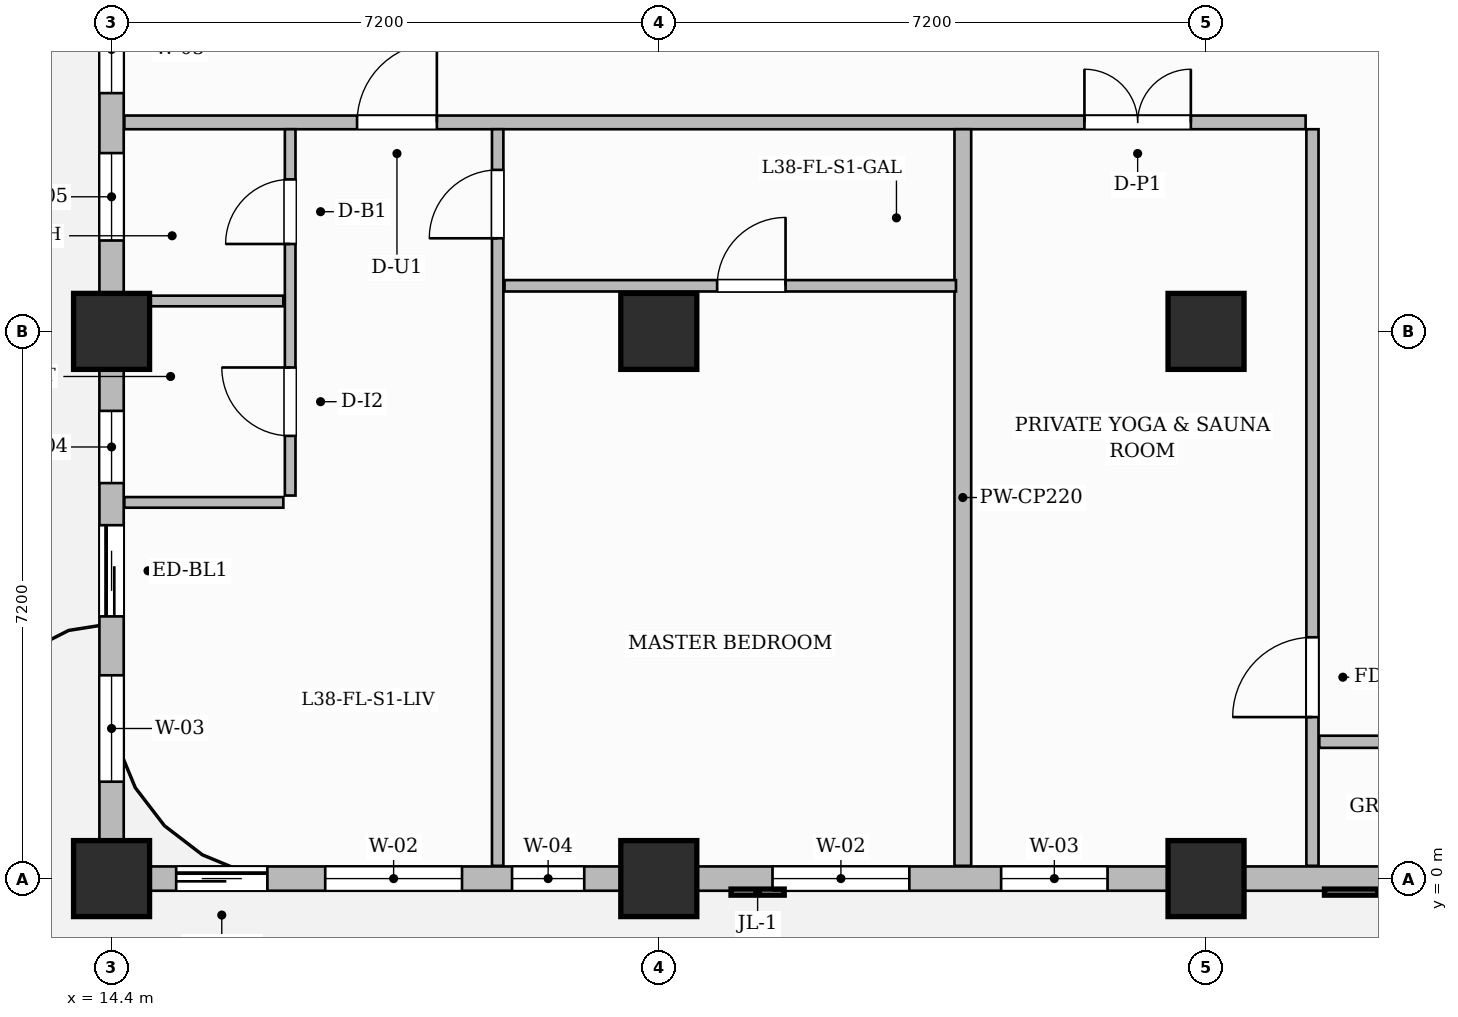
"""IFC4 building model, lengths in metres.
Left out: names, types, materials, properties, quantities, classifications, styles, units other than length and angle.
Written with IfcOpenShell. Run it as: python <this file> out.ifc"""

import sys

from ifc_helpers import new_model, si_unit, direction, frame, frame_2d, origin, origin_2d, place, context, subcontext, project, spatial, rectangle, extrude, source, transform, mapped, element, fill, save


model = new_model("IFC4")
c1 = context("Model", 3, precision=1e-05, world=origin(), true_north=direction((0.0, 1.0)))
c2 = subcontext(c1, "Body", "Model", "MODEL_VIEW")
j1 = project(units=[si_unit("LENGTHUNIT", "METRE"), si_unit("PLANEANGLEUNIT", "RADIAN")], contexts=[c1])
p1 = place(None, origin())
s1 = spatial("IfcSite", under=j1, at=p1, CompositionType="ELEMENT")
p2 = place(p1, origin())
s2 = spatial("IfcBuilding", under=s1, at=p2, CompositionType="ELEMENT")
p3 = place(p2, frame((0.0, 0.0, 154.15)))
s3 = spatial("IfcBuildingStorey", under=s2, at=p3, CompositionType="ELEMENT", Elevation=154.15)
m1 = source(origin(), c2, "Body", "SweptSolid", [
    extrude(rectangle(XDim=1.0, YDim=1.0, at=origin_2d()), origin(), (0.0, 0.0, 1.0), 3.85),
])
for number, where, z_axis, x_axis in (
    (1, (14.4, 0.0, 0.0), (0.0, 0.0, 1.0), (1.0, 0.0, 0.0)),
    (2, (14.4, 7.2, 0.0), (0.0, 0.0, 1.0), (1.0, 0.0, 0.0)),
    (3, (21.6, 0.0, 0.0), (0.0, 0.0, 1.0), (1.0, 0.0, 0.0)),
    (4, (21.6, 7.2, 0.0), (0.0, 0.0, 1.0), (1.0, 0.0, 0.0)),
    (5, (28.8, 0.0, 0.0), (0.0, 0.0, 1.0), (1.0, 0.0, 0.0)),
    (6, (28.8, 7.2, 0.0), (0.0, 0.0, 1.0), (1.0, 0.0, 0.0)),
):
    element("IfcColumn", number, at=place(p3, frame(where, z_axis=z_axis, x_axis=x_axis)), inside=s3, PredefinedType="COLUMN", context=c2, shape_type="MappedRepresentation", body=[
        mapped(m1, transform((0.0, 0.0, 0.0), scale=1.0)),
    ])
p4 = place(p3, frame((14.568, 9.95, 0.0), z_axis=(0.0, 0.0, 1.0), x_axis=(1.0, 0.0, 0.0)))
e7 = element("IfcWall", 7, at=p4, inside=s3, PredefinedType="PARTITIONING", context=c2, shape_type="SweptSolid", body=[
    extrude(rectangle(XDim=15.542, YDim=0.18, at=frame_2d((7.771, 0.0))), origin(), (0.0, 0.0, 1.0), 3.6),
])
p5 = place(p4, frame((3.062, 0.0, 0.0)))
e8 = element("IfcOpeningElement", 8, at=p5, cuts=e7, PredefinedType="OPENING", context=c2, shape_type="SweptSolid", body=[
    extrude(rectangle(XDim=1.05, YDim=2.25, at=frame_2d((0.525, 1.125))), frame((0.0, 0.1, 0.0), z_axis=(0.0, -1.0, 0.0), x_axis=(1.0, 0.0, 0.0)), (0.0, 0.0, 1.0), 0.2),
])
p6 = place(p4, frame((12.632, 0.0, 0.0)))
e9 = element("IfcOpeningElement", 9, at=p6, cuts=e7, PredefinedType="OPENING", context=c2, shape_type="SweptSolid", body=[
    extrude(rectangle(XDim=1.4, YDim=2.35, at=frame_2d((0.7, 1.175))), frame((0.0, 0.1, 0.0), z_axis=(0.0, -1.0, 0.0), x_axis=(1.0, 0.0, 0.0)), (0.0, 0.0, 1.0), 0.2),
])
p7 = place(p3, frame((30.2, 0.168, 0.0), z_axis=(0.0, 0.0, 1.0), x_axis=(0.0, 1.0, 0.0)))
e10 = element("IfcWall", 10, at=p7, inside=s3, PredefinedType="PARTITIONING", context=c2, shape_type="SweptSolid", body=[
    extrude(rectangle(XDim=9.692, YDim=0.16, at=frame_2d((4.846, 0.0))), origin(), (0.0, 0.0, 1.0), 3.6),
])
p8 = place(p7, frame((1.957, 0.0, 0.0)))
e11 = element("IfcOpeningElement", 11, at=p8, cuts=e10, PredefinedType="OPENING", context=c2, shape_type="SweptSolid", body=[
    extrude(rectangle(XDim=1.05, YDim=2.15, at=frame_2d((0.525, 1.075))), frame((0.0, 0.09, 0.0), z_axis=(0.0, -1.0, 0.0), x_axis=(1.0, 0.0, 0.0)), (0.0, 0.0, 1.0), 0.18),
])
p9 = place(p3, frame((30.29, 1.8, 0.0), z_axis=(0.0, 0.0, 1.0), x_axis=(1.0, 0.0, 0.0)))
e12 = element("IfcWall", 12, at=p9, inside=s3, PredefinedType="PARTITIONING", context=c2, shape_type="SweptSolid", body=[
    extrude(rectangle(XDim=19.37, YDim=0.16, at=frame_2d((9.685, 0.0))), origin(), (0.0, 0.0, 1.0), 3.6),
])
p10 = place(p9, frame((5.074, 0.0, 0.0)))
e13 = element("IfcOpeningElement", 13, at=p10, cuts=e12, PredefinedType="OPENING", context=c2, shape_type="SweptSolid", body=[
    extrude(rectangle(XDim=0.9, YDim=2.15, at=frame_2d((0.45, 1.075))), frame((0.0, 0.09, 0.0), z_axis=(0.0, -1.0, 0.0), x_axis=(1.0, 0.0, 0.0)), (0.0, 0.0, 1.0), 0.18),
])
p11 = place(p9, frame((14.06, 0.0, 0.0)))
e14 = element("IfcOpeningElement", 14, at=p11, cuts=e12, PredefinedType="OPENING", context=c2, shape_type="SweptSolid", body=[
    extrude(rectangle(XDim=0.9, YDim=2.15, at=frame_2d((0.45, 1.075))), frame((0.0, 0.09, 0.0), z_axis=(0.0, -1.0, 0.0), x_axis=(1.0, 0.0, 0.0)), (0.0, 0.0, 1.0), 0.18),
])
p12 = place(p3, frame((25.6, 0.168, 0.0), z_axis=(0.0, 0.0, 1.0), x_axis=(0.0, 1.0, 0.0)))
e15 = element("IfcWall", 15, at=p12, inside=s3, PredefinedType="PARTITIONING", context=c2, shape_type="SweptSolid", body=[
    extrude(rectangle(XDim=9.692, YDim=0.22, at=frame_2d((4.846, 0.0))), origin(), (0.0, 0.0, 1.0), 3.6),
])
p13 = place(p3, frame((16.75, 5.04, 0.0), z_axis=(0.0, 0.0, 1.0), x_axis=(0.0, 1.0, 0.0)))
e16 = element("IfcWall", 16, at=p13, inside=s3, PredefinedType="PARTITIONING", context=c2, shape_type="SweptSolid", body=[
    extrude(rectangle(XDim=4.82, YDim=0.14, at=frame_2d((2.41, 0.0))), origin(), (0.0, 0.0, 1.0), 3.6),
])
p14 = place(p13, frame((0.785, 0.0, 0.0)))
e17 = element("IfcOpeningElement", 17, at=p14, cuts=e16, PredefinedType="OPENING", context=c2, shape_type="SweptSolid", body=[
    extrude(rectangle(XDim=0.9, YDim=2.15, at=frame_2d((0.45, 1.075))), frame((0.0, 0.08, 0.0), z_axis=(0.0, -1.0, 0.0), x_axis=(1.0, 0.0, 0.0)), (0.0, 0.0, 1.0), 0.16),
])
p15 = place(p13, frame((3.31, 0.0, 0.0)))
e18 = element("IfcOpeningElement", 18, at=p15, cuts=e16, PredefinedType="OPENING", context=c2, shape_type="SweptSolid", body=[
    extrude(rectangle(XDim=0.85, YDim=2.1, at=frame_2d((0.425, 1.05))), frame((0.0, 0.08, 0.0), z_axis=(0.0, -1.0, 0.0), x_axis=(1.0, 0.0, 0.0)), (0.0, 0.0, 1.0), 0.16),
])
p16 = place(p3, frame((14.59, 7.6, 0.0), z_axis=(0.0, 0.0, 1.0), x_axis=(1.0, 0.0, 0.0)))
e19 = element("IfcWall", 19, at=p16, inside=s3, PredefinedType="PARTITIONING", context=c2, shape_type="SweptSolid", body=[
    extrude(rectangle(XDim=2.07, YDim=0.14, at=frame_2d((1.035, 0.0))), origin(), (0.0, 0.0, 1.0), 3.6),
])
p17 = place(p3, frame((14.568, 4.95, 0.0), z_axis=(0.0, 0.0, 1.0), x_axis=(1.0, 0.0, 0.0)))
e20 = element("IfcWall", 20, at=p17, inside=s3, PredefinedType="PARTITIONING", context=c2, shape_type="SweptSolid", body=[
    extrude(rectangle(XDim=2.092, YDim=0.14, at=frame_2d((1.046, 0.0))), origin(), (0.0, 0.0, 1.0), 3.6),
])
p18 = place(p3, frame((19.48, 0.168, 0.0), z_axis=(0.0, 0.0, 1.0), x_axis=(0.0, 1.0, 0.0)))
e21 = element("IfcWall", 21, at=p18, inside=s3, PredefinedType="PARTITIONING", context=c2, shape_type="SweptSolid", body=[
    extrude(rectangle(XDim=9.692, YDim=0.15, at=frame_2d((4.846, 0.0))), origin(), (0.0, 0.0, 1.0), 3.6),
])
p19 = place(p18, frame((8.257, 0.0, 0.0)))
e22 = element("IfcOpeningElement", 22, at=p19, cuts=e21, PredefinedType="OPENING", context=c2, shape_type="SweptSolid", body=[
    extrude(rectangle(XDim=0.9, YDim=2.15, at=frame_2d((0.45, 1.075))), frame((0.0, 0.085, 0.0), z_axis=(0.0, -1.0, 0.0), x_axis=(1.0, 0.0, 0.0)), (0.0, 0.0, 1.0), 0.17),
])
p20 = place(p3, frame((19.57, 7.8, 0.0), z_axis=(0.0, 0.0, 1.0), x_axis=(1.0, 0.0, 0.0)))
e23 = element("IfcWall", 23, at=p20, inside=s3, PredefinedType="PARTITIONING", context=c2, shape_type="SweptSolid", body=[
    extrude(rectangle(XDim=5.94, YDim=0.15, at=frame_2d((2.97, 0.0))), origin(), (0.0, 0.0, 1.0), 3.6),
])
p21 = place(p20, frame((2.798, 0.0, 0.0)))
e24 = element("IfcOpeningElement", 24, at=p21, cuts=e23, PredefinedType="OPENING", context=c2, shape_type="SweptSolid", body=[
    extrude(rectangle(XDim=0.9, YDim=2.15, at=frame_2d((0.45, 1.075))), frame((0.0, 0.085, 0.0), z_axis=(0.0, -1.0, 0.0), x_axis=(1.0, 0.0, 0.0)), (0.0, 0.0, 1.0), 0.17),
])
p22 = place(p3, frame((14.4, 0.0, 0.0), z_axis=(0.0, 0.0, 1.0), x_axis=(1.0, 0.0, 0.0)))
e25 = element("IfcWall", 25, at=p22, inside=s3, PredefinedType="SOLIDWALL", context=c2, shape_type="SweptSolid", body=[
    extrude(rectangle(XDim=35.4, YDim=0.32, at=frame_2d((17.7, 0.0))), origin(), (0.0, 0.0, 1.0), 3.085),
])
p23 = place(p22, frame((0.85, 0.0, 0.0)))
e26 = element("IfcOpeningElement", 26, at=p23, cuts=e25, PredefinedType="OPENING", context=c2, shape_type="SweptSolid", body=[
    extrude(rectangle(XDim=1.2, YDim=2.2, at=frame_2d((0.6, 1.1))), frame((0.0, 0.17, 0.0), z_axis=(0.0, -1.0, 0.0), x_axis=(1.0, 0.0, 0.0)), (0.0, 0.0, 1.0), 0.34),
])
p24 = place(p22, frame((2.811, 0.0, 0.8)))
e27 = element("IfcOpeningElement", 27, at=p24, cuts=e25, PredefinedType="OPENING", context=c2, shape_type="SweptSolid", body=[
    extrude(rectangle(XDim=1.8, YDim=1.85, at=frame_2d((0.9, 0.925))), frame((0.0, 0.17, 0.0), z_axis=(0.0, -1.0, 0.0), x_axis=(1.0, 0.0, 0.0)), (0.0, 0.0, 1.0), 0.34),
])
p25 = place(p22, frame((5.269, 0.0, 0.8)))
e28 = element("IfcOpeningElement", 28, at=p25, cuts=e25, PredefinedType="OPENING", context=c2, shape_type="SweptSolid", body=[
    extrude(rectangle(XDim=0.95, YDim=1.75, at=frame_2d((0.475, 0.875))), frame((0.0, 0.17, 0.0), z_axis=(0.0, -1.0, 0.0), x_axis=(1.0, 0.0, 0.0)), (0.0, 0.0, 1.0), 0.34),
])
p26 = place(p22, frame((8.696, 0.0, 0.8)))
e29 = element("IfcOpeningElement", 29, at=p26, cuts=e25, PredefinedType="OPENING", context=c2, shape_type="SweptSolid", body=[
    extrude(rectangle(XDim=1.8, YDim=1.85, at=frame_2d((0.9, 0.925))), frame((0.0, 0.17, 0.0), z_axis=(0.0, -1.0, 0.0), x_axis=(1.0, 0.0, 0.0)), (0.0, 0.0, 1.0), 0.34),
])
p27 = place(p22, frame((11.704, 0.0, 0.8)))
e30 = element("IfcOpeningElement", 30, at=p27, cuts=e25, PredefinedType="OPENING", context=c2, shape_type="SweptSolid", body=[
    extrude(rectangle(XDim=1.4, YDim=1.85, at=frame_2d((0.7, 0.925))), frame((0.0, 0.17, 0.0), z_axis=(0.0, -1.0, 0.0), x_axis=(1.0, 0.0, 0.0)), (0.0, 0.0, 1.0), 0.34),
])
p28 = place(p22, frame((16.804, 0.0, 0.8)))
e31 = element("IfcOpeningElement", 31, at=p28, cuts=e25, PredefinedType="OPENING", context=c2, shape_type="SweptSolid", body=[
    extrude(rectangle(XDim=1.8, YDim=1.85, at=frame_2d((0.9, 0.925))), frame((0.0, 0.17, 0.0), z_axis=(0.0, -1.0, 0.0), x_axis=(1.0, 0.0, 0.0)), (0.0, 0.0, 1.0), 0.34),
])
p29 = place(p22, frame((22.396, 0.0, 0.8)))
e32 = element("IfcOpeningElement", 32, at=p29, cuts=e25, PredefinedType="OPENING", context=c2, shape_type="SweptSolid", body=[
    extrude(rectangle(XDim=1.8, YDim=1.85, at=frame_2d((0.9, 0.925))), frame((0.0, 0.17, 0.0), z_axis=(0.0, -1.0, 0.0), x_axis=(1.0, 0.0, 0.0)), (0.0, 0.0, 1.0), 0.34),
])
p30 = place(p22, frame((25.629, 0.0, 0.8)))
e33 = element("IfcOpeningElement", 33, at=p30, cuts=e25, PredefinedType="OPENING", context=c2, shape_type="SweptSolid", body=[
    extrude(rectangle(XDim=0.95, YDim=1.75, at=frame_2d((0.475, 0.875))), frame((0.0, 0.17, 0.0), z_axis=(0.0, -1.0, 0.0), x_axis=(1.0, 0.0, 0.0)), (0.0, 0.0, 1.0), 0.34),
])
p31 = place(p22, frame((29.075, 0.0, 0.8)))
e34 = element("IfcOpeningElement", 34, at=p31, cuts=e25, PredefinedType="OPENING", context=c2, shape_type="SweptSolid", body=[
    extrude(rectangle(XDim=1.8, YDim=1.85, at=frame_2d((0.9, 0.925))), frame((0.0, 0.17, 0.0), z_axis=(0.0, -1.0, 0.0), x_axis=(1.0, 0.0, 0.0)), (0.0, 0.0, 1.0), 0.34),
])
p32 = place(p22, frame((32.125, 0.0, 0.8)))
e35 = element("IfcOpeningElement", 35, at=p32, cuts=e25, PredefinedType="OPENING", context=c2, shape_type="SweptSolid", body=[
    extrude(rectangle(XDim=1.8, YDim=1.85, at=frame_2d((0.9, 0.925))), frame((0.0, 0.17, 0.0), z_axis=(0.0, -1.0, 0.0), x_axis=(1.0, 0.0, 0.0)), (0.0, 0.0, 1.0), 0.34),
])
p33 = place(p3, frame((14.4, 0.05, 0.0), z_axis=(0.0, 0.0, 1.0), x_axis=(0.0, 1.0, 0.0)))
e36 = element("IfcWall", 36, at=p33, inside=s3, PredefinedType="SOLIDWALL", context=c2, shape_type="SweptSolid", body=[
    extrude(rectangle(XDim=20.6, YDim=0.32, at=frame_2d((10.3, 0.0))), origin(), (0.0, 0.0, 1.0), 3.085),
])
p34 = place(p33, frame((3.4, 0.0, 0.0)))
e37 = element("IfcOpeningElement", 37, at=p34, cuts=e36, PredefinedType="OPENING", context=c2, shape_type="SweptSolid", body=[
    extrude(rectangle(XDim=1.2, YDim=2.2, at=frame_2d((0.6, 1.1))), frame((0.0, 0.17, 0.0), z_axis=(0.0, -1.0, 0.0), x_axis=(1.0, 0.0, 0.0)), (0.0, 0.0, 1.0), 0.34),
])
p35 = place(p33, frame((1.225, 0.0, 0.8)))
e38 = element("IfcOpeningElement", 38, at=p35, cuts=e36, PredefinedType="OPENING", context=c2, shape_type="SweptSolid", body=[
    extrude(rectangle(XDim=1.4, YDim=1.85, at=frame_2d((0.7, 0.925))), frame((0.0, 0.17, 0.0), z_axis=(0.0, -1.0, 0.0), x_axis=(1.0, 0.0, 0.0)), (0.0, 0.0, 1.0), 0.34),
])
p36 = place(p33, frame((5.154, 0.0, 0.8)))
e39 = element("IfcOpeningElement", 39, at=p36, cuts=e36, PredefinedType="OPENING", context=c2, shape_type="SweptSolid", body=[
    extrude(rectangle(XDim=0.95, YDim=1.75, at=frame_2d((0.475, 0.875))), frame((0.0, 0.17, 0.0), z_axis=(0.0, -1.0, 0.0), x_axis=(1.0, 0.0, 0.0)), (0.0, 0.0, 1.0), 0.34),
])
p37 = place(p33, frame((8.346, 0.0, 0.8)))
e40 = element("IfcOpeningElement", 40, at=p37, cuts=e36, PredefinedType="OPENING", context=c2, shape_type="SweptSolid", body=[
    extrude(rectangle(XDim=1.15, YDim=1.8, at=frame_2d((0.575, 0.9))), frame((0.0, 0.17, 0.0), z_axis=(0.0, -1.0, 0.0), x_axis=(1.0, 0.0, 0.0)), (0.0, 0.0, 1.0), 0.34),
])
p38 = place(p33, frame((10.285, 0.0, 0.8)))
e41 = element("IfcOpeningElement", 41, at=p38, cuts=e36, PredefinedType="OPENING", context=c2, shape_type="SweptSolid", body=[
    extrude(rectangle(XDim=1.15, YDim=1.8, at=frame_2d((0.575, 0.9))), frame((0.0, 0.17, 0.0), z_axis=(0.0, -1.0, 0.0), x_axis=(1.0, 0.0, 0.0)), (0.0, 0.0, 1.0), 0.34),
])
p39 = place(p33, frame((12.114, 0.0, 0.8)))
e42 = element("IfcOpeningElement", 42, at=p39, cuts=e36, PredefinedType="OPENING", context=c2, shape_type="SweptSolid", body=[
    extrude(rectangle(XDim=1.15, YDim=1.8, at=frame_2d((0.575, 0.9))), frame((0.0, 0.17, 0.0), z_axis=(0.0, -1.0, 0.0), x_axis=(1.0, 0.0, 0.0)), (0.0, 0.0, 1.0), 0.34),
])
p40 = place(p33, frame((16.79, 0.0, 0.8)))
e43 = element("IfcOpeningElement", 43, at=p40, cuts=e36, PredefinedType="OPENING", context=c2, shape_type="SweptSolid", body=[
    extrude(rectangle(XDim=1.8, YDim=1.85, at=frame_2d((0.9, 0.925))), frame((0.0, 0.17, 0.0), z_axis=(0.0, -1.0, 0.0), x_axis=(1.0, 0.0, 0.0)), (0.0, 0.0, 1.0), 0.34),
])
m2 = source(origin(), c2, "Body", "SweptSolid", [
    extrude(rectangle(XDim=1.05, YDim=2.15, at=frame_2d((0.525, 1.075))), frame((0.0, 0.025, 0.0), z_axis=(0.0, -1.0, 0.0), x_axis=(1.0, 0.0, 0.0)), (0.0, 0.0, 1.0), 0.05),
])
p41 = place(p8, origin())
e44 = element("IfcDoor", 44, at=p41, inside=s3, OperationType="SINGLE_SWING_LEFT", PredefinedType="DOOR", context=c2, shape_type="MappedRepresentation", body=[
    mapped(m2, transform((0.0, 0.0, 0.0), scale=1.0)),
])
fill(e11, e44)
m3 = source(origin(), c2, "Body", "SweptSolid", [
    extrude(rectangle(XDim=0.9, YDim=2.15, at=frame_2d((0.45, 1.075))), frame((0.0, 0.025, 0.0), z_axis=(0.0, -1.0, 0.0), x_axis=(1.0, 0.0, 0.0)), (0.0, 0.0, 1.0), 0.05),
])
p42 = place(p14, origin())
e45 = element("IfcDoor", 45, at=p42, inside=s3, OperationType="SINGLE_SWING_RIGHT", PredefinedType="DOOR", context=c2, shape_type="MappedRepresentation", body=[
    mapped(m3, transform((0.0, 0.0, 0.0), scale=1.0)),
])
fill(e17, e45)
m4 = source(origin(), c2, "Body", "SweptSolid", [
    extrude(rectangle(XDim=0.85, YDim=2.1, at=frame_2d((0.425, 1.05))), frame((0.0, 0.025, 0.0), z_axis=(0.0, -1.0, 0.0), x_axis=(1.0, 0.0, 0.0)), (0.0, 0.0, 1.0), 0.05),
])
p43 = place(p15, origin())
e46 = element("IfcDoor", 46, at=p43, inside=s3, OperationType="SINGLE_SWING_LEFT", PredefinedType="DOOR", context=c2, shape_type="MappedRepresentation", body=[
    mapped(m4, transform((0.0, 0.0, 0.0), scale=1.0)),
])
fill(e18, e46)
m5 = source(origin(), c2, "Body", "SweptSolid", [
    extrude(rectangle(XDim=1.05, YDim=2.25, at=frame_2d((0.525, 1.125))), frame((0.0, 0.025, 0.0), z_axis=(0.0, -1.0, 0.0), x_axis=(1.0, 0.0, 0.0)), (0.0, 0.0, 1.0), 0.05),
])
p44 = place(p5, origin())
e47 = element("IfcDoor", 47, at=p44, inside=s3, OperationType="SINGLE_SWING_RIGHT", PredefinedType="DOOR", context=c2, shape_type="MappedRepresentation", body=[
    mapped(m5, transform((0.0, 0.0, 0.0), scale=1.0)),
])
fill(e8, e47)
p45 = place(p19, origin())
e48 = element("IfcDoor", 48, at=p45, inside=s3, OperationType="SINGLE_SWING_LEFT", PredefinedType="DOOR", context=c2, shape_type="MappedRepresentation", body=[
    mapped(m3, transform((0.0, 0.0, 0.0), scale=1.0)),
])
fill(e22, e48)
p46 = place(p21, origin())
e49 = element("IfcDoor", 49, at=p46, inside=s3, OperationType="SINGLE_SWING_RIGHT", PredefinedType="DOOR", context=c2, shape_type="MappedRepresentation", body=[
    mapped(m3, transform((0.0, 0.0, 0.0), scale=1.0)),
])
fill(e24, e49)
m6 = source(origin(), c2, "Body", "SweptSolid", [
    extrude(rectangle(XDim=1.4, YDim=2.35, at=frame_2d((0.7, 1.175))), frame((0.0, 0.025, 0.0), z_axis=(0.0, -1.0, 0.0), x_axis=(1.0, 0.0, 0.0)), (0.0, 0.0, 1.0), 0.05),
])
p47 = place(p6, origin())
e50 = element("IfcDoor", 50, at=p47, inside=s3, OperationType="DOUBLE_DOOR_SINGLE_SWING", PredefinedType="DOOR", context=c2, shape_type="MappedRepresentation", body=[
    mapped(m6, transform((0.0, 0.0, 0.0), scale=1.0)),
])
fill(e9, e50)
m7 = source(origin(), c2, "Body", "SweptSolid", [
    extrude(rectangle(XDim=1.2, YDim=2.2, at=frame_2d((0.6, 1.1))), frame((0.0, 0.025, 0.0), z_axis=(0.0, -1.0, 0.0), x_axis=(1.0, 0.0, 0.0)), (0.0, 0.0, 1.0), 0.05),
])
p48 = place(p23, origin())
e51 = element("IfcDoor", 51, at=p48, inside=s3, OperationType="SLIDING_TO_LEFT", PredefinedType="DOOR", context=c2, shape_type="MappedRepresentation", body=[
    mapped(m7, transform((0.0, 0.0, 0.0), scale=1.0)),
])
fill(e26, e51)
p49 = place(p34, origin())
e52 = element("IfcDoor", 52, at=p49, inside=s3, OperationType="SLIDING_TO_LEFT", PredefinedType="DOOR", context=c2, shape_type="MappedRepresentation", body=[
    mapped(m7, transform((0.0, 0.0, 0.0), scale=1.0)),
])
fill(e37, e52)
m8 = source(origin(), c2, "Body", "SweptSolid", [
    extrude(rectangle(XDim=1.8, YDim=1.85, at=frame_2d((0.9, 0.925))), frame((0.0, 0.03, 0.0), z_axis=(0.0, -1.0, 0.0), x_axis=(1.0, 0.0, 0.0)), (0.0, 0.0, 1.0), 0.06),
])
p50 = place(p24, origin())
e53 = element("IfcWindow", 53, at=p50, inside=s3, PartitioningType="DOUBLE_PANEL_VERTICAL", PredefinedType="WINDOW", context=c2, shape_type="MappedRepresentation", body=[
    mapped(m8, transform((0.0, 0.0, 0.0), scale=1.0)),
])
fill(e27, e53)
m9 = source(origin(), c2, "Body", "SweptSolid", [
    extrude(rectangle(XDim=0.95, YDim=1.75, at=frame_2d((0.475, 0.875))), frame((0.0, 0.03, 0.0), z_axis=(0.0, -1.0, 0.0), x_axis=(1.0, 0.0, 0.0)), (0.0, 0.0, 1.0), 0.06),
])
p51 = place(p25, origin())
e54 = element("IfcWindow", 54, at=p51, inside=s3, PartitioningType="SINGLE_PANEL", PredefinedType="WINDOW", context=c2, shape_type="MappedRepresentation", body=[
    mapped(m9, transform((0.0, 0.0, 0.0), scale=1.0)),
])
fill(e28, e54)
p52 = place(p26, origin())
e55 = element("IfcWindow", 55, at=p52, inside=s3, PartitioningType="DOUBLE_PANEL_VERTICAL", PredefinedType="WINDOW", context=c2, shape_type="MappedRepresentation", body=[
    mapped(m8, transform((0.0, 0.0, 0.0), scale=1.0)),
])
fill(e29, e55)
m10 = source(origin(), c2, "Body", "SweptSolid", [
    extrude(rectangle(XDim=1.4, YDim=1.85, at=frame_2d((0.7, 0.925))), frame((0.0, 0.03, 0.0), z_axis=(0.0, -1.0, 0.0), x_axis=(1.0, 0.0, 0.0)), (0.0, 0.0, 1.0), 0.06),
])
p53 = place(p27, origin())
e56 = element("IfcWindow", 56, at=p53, inside=s3, PartitioningType="SINGLE_PANEL", PredefinedType="WINDOW", context=c2, shape_type="MappedRepresentation", body=[
    mapped(m10, transform((0.0, 0.0, 0.0), scale=1.0)),
])
fill(e30, e56)
p54 = place(p35, origin())
e57 = element("IfcWindow", 57, at=p54, inside=s3, PartitioningType="SINGLE_PANEL", PredefinedType="WINDOW", context=c2, shape_type="MappedRepresentation", body=[
    mapped(m10, transform((0.0, 0.0, 0.0), scale=1.0)),
])
fill(e38, e57)
p55 = place(p36, origin())
e58 = element("IfcWindow", 58, at=p55, inside=s3, PartitioningType="SINGLE_PANEL", PredefinedType="WINDOW", context=c2, shape_type="MappedRepresentation", body=[
    mapped(m9, transform((0.0, 0.0, 0.0), scale=1.0)),
])
fill(e39, e58)
m11 = source(origin(), c2, "Body", "SweptSolid", [
    extrude(rectangle(XDim=1.15, YDim=1.8, at=frame_2d((0.575, 0.9))), frame((0.0, 0.03, 0.0), z_axis=(0.0, -1.0, 0.0), x_axis=(1.0, 0.0, 0.0)), (0.0, 0.0, 1.0), 0.06),
])
p56 = place(p37, origin())
e59 = element("IfcWindow", 59, at=p56, inside=s3, PartitioningType="SINGLE_PANEL", PredefinedType="WINDOW", context=c2, shape_type="MappedRepresentation", body=[
    mapped(m11, transform((0.0, 0.0, 0.0), scale=1.0)),
])
fill(e40, e59)
p57 = place(p38, origin())
e60 = element("IfcWindow", 60, at=p57, inside=s3, PartitioningType="SINGLE_PANEL", PredefinedType="WINDOW", context=c2, shape_type="MappedRepresentation", body=[
    mapped(m11, transform((0.0, 0.0, 0.0), scale=1.0)),
])
fill(e41, e60)
save(model, sys.argv[1])
